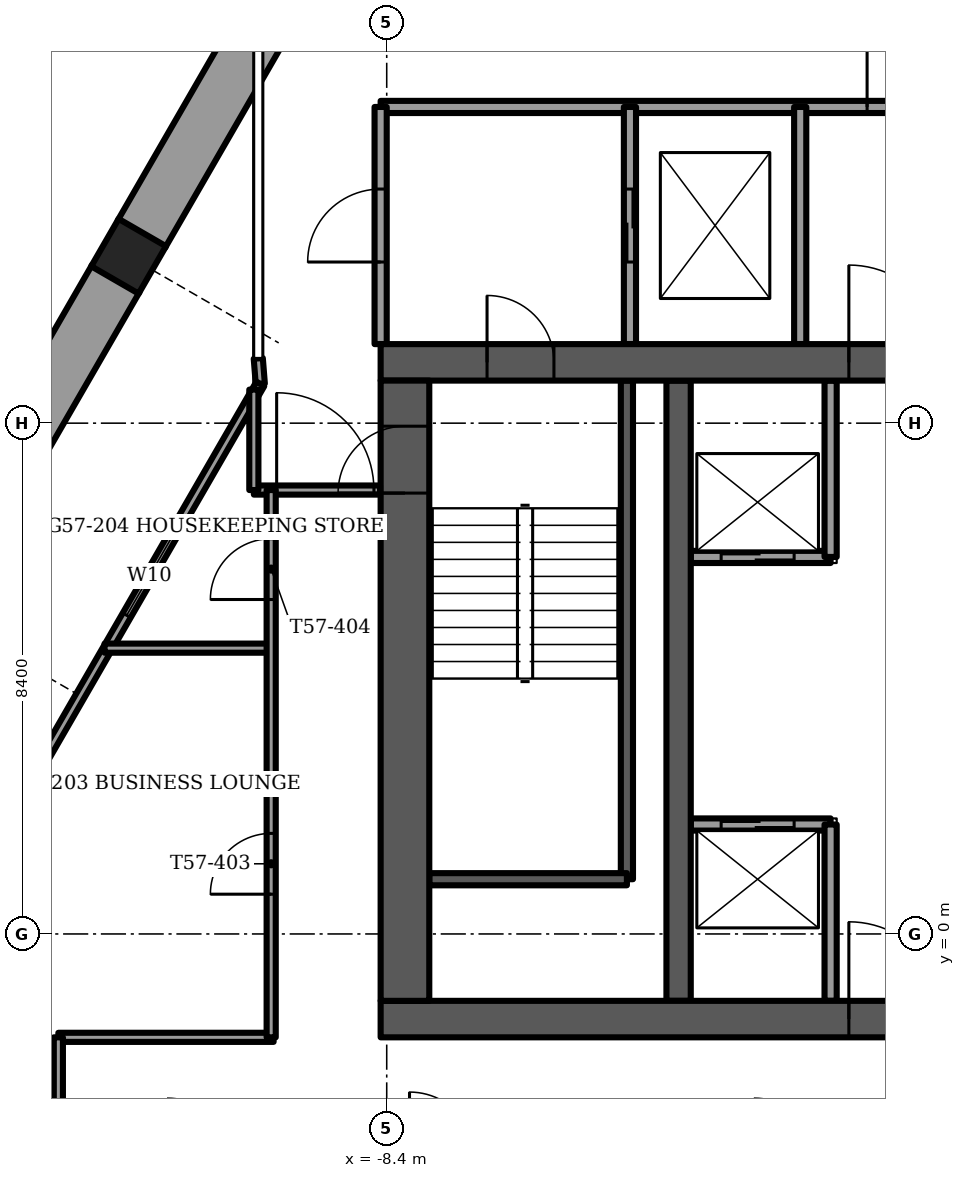
"""IFC4 building model, lengths in metres.
Left out: names, types, materials, properties, quantities, classifications, styles, units other than length and angle.
Written with IfcOpenShell. Run it as: python <this file> out.ifc"""

import sys

from ifc_helpers import new_model, si_unit, direction, frame, frame_2d, origin, origin_2d, place, context, subcontext, project, spatial, rectangle, extrude, element, fill, save


model = new_model("IFC4")
c1 = context("Model", 3, precision=1e-05, world=origin(), true_north=direction((0.0, 1.0)))
c2 = subcontext(c1, "Body", "Model", "MODEL_VIEW")
j1 = project(units=[si_unit("LENGTHUNIT", "METRE"), si_unit("PLANEANGLEUNIT", "RADIAN")], contexts=[c1])
p1 = place(None, origin())
s1 = spatial("IfcSite", under=j1, at=p1, CompositionType="ELEMENT")
p2 = place(p1, origin())
s2 = spatial("IfcBuilding", under=s1, at=p2, CompositionType="ELEMENT")
p3 = place(p2, frame((0.0, 0.0, 229.5)))
s3 = spatial("IfcBuildingStorey", under=s2, at=p3, CompositionType="ELEMENT", Elevation=229.5)
p4 = place(p3, frame((-12.644, 11.145, -1.2), z_axis=(0.0, 0.0, 1.0), x_axis=(0.5, 0.866025403784, 0.0)))
e1 = element("IfcColumn", 1, at=p4, inside=s3, PredefinedType="COLUMN", context=c2, shape_type="SweptSolid", body=[
    extrude(rectangle(XDim=0.9, YDim=0.9, at=origin_2d()), origin(), (0.0, 0.0, 1.0), 3.75),
])
p5 = place(p3, frame((-8.5, -1.4, -0.3), z_axis=(0.0, 0.0, 1.0), x_axis=(1.0, 0.0, 0.0)))
e2 = element("IfcWall", 2, at=p5, inside=s3, PredefinedType="SHEAR", context=c2, shape_type="SweptSolid", body=[
    extrude(rectangle(XDim=17.0, YDim=0.6, at=frame_2d((8.5, 0.0))), origin(), (0.0, 0.0, 1.0), 3.75),
])
p6 = place(p5, frame((7.7, 0.0, 0.0)))
e3 = element("IfcOpeningElement", 3, at=p6, cuts=e2, PredefinedType="OPENING", context=c2, shape_type="SweptSolid", body=[
    extrude(rectangle(XDim=1.6, YDim=2.1, at=frame_2d((0.8, 1.05))), frame((0.0, 0.3, 0.0), z_axis=(0.0, -1.0, 0.0), x_axis=(1.0, 0.0, 0.0)), (0.0, 0.0, 1.0), 0.6),
])
p7 = place(p3, frame((-8.5, 9.4, -0.3), z_axis=(0.0, 0.0, 1.0), x_axis=(1.0, 0.0, 0.0)))
e4 = element("IfcWall", 4, at=p7, inside=s3, PredefinedType="SHEAR", context=c2, shape_type="SweptSolid", body=[
    extrude(rectangle(XDim=17.0, YDim=0.6, at=frame_2d((8.5, 0.0))), origin(), (0.0, 0.0, 1.0), 3.75),
])
p8 = place(p7, frame((7.7, 0.0, 0.0)))
e5 = element("IfcOpeningElement", 5, at=p8, cuts=e4, PredefinedType="OPENING", context=c2, shape_type="SweptSolid", body=[
    extrude(rectangle(XDim=1.6, YDim=2.1, at=frame_2d((0.8, 1.05))), frame((0.0, 0.3, 0.0), z_axis=(0.0, -1.0, 0.0), x_axis=(1.0, 0.0, 0.0)), (0.0, 0.0, 1.0), 0.6),
])
p9 = place(p7, frame((1.75, 0.0, 0.0)))
e6 = element("IfcOpeningElement", 6, at=p9, cuts=e4, PredefinedType="OPENING", context=c2, shape_type="SweptSolid", body=[
    extrude(rectangle(XDim=1.1, YDim=2.1, at=frame_2d((0.55, 1.05))), frame((0.0, 0.3, 0.0), z_axis=(0.0, -1.0, 0.0), x_axis=(1.0, 0.0, 0.0)), (0.0, 0.0, 1.0), 0.6),
])
p10 = place(p7, frame((14.15, 0.0, 0.0)))
e7 = element("IfcOpeningElement", 7, at=p10, cuts=e4, PredefinedType="OPENING", context=c2, shape_type="SweptSolid", body=[
    extrude(rectangle(XDim=1.1, YDim=2.1, at=frame_2d((0.55, 1.05))), frame((0.0, 0.3, 0.0), z_axis=(0.0, -1.0, 0.0), x_axis=(1.0, 0.0, 0.0)), (0.0, 0.0, 1.0), 0.6),
])
p11 = place(p3, frame((-8.1, -1.1, -0.3), z_axis=(0.0, 0.0, 1.0), x_axis=(0.0, 1.0, 0.0)))
e8 = element("IfcWall", 8, at=p11, inside=s3, PredefinedType="SHEAR", context=c2, shape_type="SweptSolid", body=[
    extrude(rectangle(XDim=10.2, YDim=0.8, at=frame_2d((5.1, 0.0))), origin(), (0.0, 0.0, 1.0), 3.75),
])
p12 = place(p11, frame((8.35, 0.0, 0.0)))
e9 = element("IfcOpeningElement", 9, at=p12, cuts=e8, PredefinedType="OPENING", context=c2, shape_type="SweptSolid", body=[
    extrude(rectangle(XDim=1.1, YDim=2.1, at=frame_2d((0.55, 1.05))), frame((0.0, 0.4, 0.0), z_axis=(0.0, -1.0, 0.0), x_axis=(1.0, 0.0, 0.0)), (0.0, 0.0, 1.0), 0.8),
])
p13 = place(p3, frame((-3.6, -1.1, -0.3), z_axis=(0.0, 0.0, 1.0), x_axis=(0.0, 1.0, 0.0)))
e10 = element("IfcWall", 10, at=p13, inside=s3, PredefinedType="SHEAR", context=c2, shape_type="SweptSolid", body=[
    extrude(rectangle(XDim=10.2, YDim=0.4, at=frame_2d((5.1, 0.0))), origin(), (0.0, 0.0, 1.0), 3.75),
])
p14 = place(p3, frame((-9.594, 16.428, 0.0), z_axis=(0.0, 0.0, 1.0), x_axis=(-0.499994028088, -0.866028851642, 0.0)))
e11 = element("IfcWall", 11, at=p14, inside=s3, PredefinedType="PARAPET", context=c2, shape_type="SweptSolid", body=[
    extrude(rectangle(XDim=5.681, YDim=0.9, at=frame_2d((2.84, 0.0))), origin(), (0.0, 0.0, 1.0), 1.1),
])
p15 = place(p3, frame((-12.854, 10.781, 0.0), z_axis=(0.0, 0.0, 1.0), x_axis=(-0.499997265274, -0.866026982673, 0.0)))
e12 = element("IfcWall", 12, at=p15, inside=s3, PredefinedType="PARAPET", context=c2, shape_type="SweptSolid", body=[
    extrude(rectangle(XDim=5.819, YDim=0.9, at=frame_2d((2.909, 0.0))), origin(), (0.0, 0.0, 1.0), 1.1),
])
p16 = place(p3, frame((-10.479, 9.045, 0.0), z_axis=(0.0, 0.0, 1.0), x_axis=(-0.49998469459, -0.866034240187, 0.0)))
e13 = element("IfcWall", 13, at=p16, inside=s3, PredefinedType="SOLIDWALL", context=c2, shape_type="SweptSolid", body=[
    extrude(rectangle(XDim=10.208, YDim=0.15, at=frame_2d((5.104, 0.0))), origin(), (0.0, 0.0, 1.0), 3.45),
])
p17 = place(p16, frame((2.894, 0.0, 0.15)))
e14 = element("IfcOpeningElement", 14, at=p17, cuts=e13, PredefinedType="OPENING", context=c2, shape_type="SweptSolid", body=[
    extrude(rectangle(XDim=1.5, YDim=2.2, at=frame_2d((0.75, 1.1))), frame((0.0, 0.075, 0.0), z_axis=(0.0, -1.0, 0.0), x_axis=(1.0, 0.0, 0.0)), (0.0, 0.0, 1.0), 0.15),
])
p18 = place(p3, frame((-15.583, -0.86, 0.0), z_axis=(0.0, 0.0, 1.0), x_axis=(0.499995050918, -0.866028261119, 0.0)))
e15 = element("IfcWall", 15, at=p18, inside=s3, PredefinedType="SOLIDWALL", context=c2, shape_type="SweptSolid", body=[
    extrude(rectangle(XDim=10.208, YDim=0.15, at=frame_2d((5.104, 0.0))), origin(), (0.0, 0.0, 1.0), 3.45),
])
p19 = place(p18, frame((3.994, 0.0, 0.15)))
e16 = element("IfcOpeningElement", 16, at=p19, cuts=e15, PredefinedType="OPENING", context=c2, shape_type="SweptSolid", body=[
    extrude(rectangle(XDim=0.9, YDim=2.2, at=frame_2d((0.45, 1.1))), frame((0.0, 0.075, 0.0), z_axis=(0.0, -1.0, 0.0), x_axis=(1.0, 0.0, 0.0)), (0.0, 0.0, 1.0), 0.15),
])
p20 = place(p18, frame((5.347, 0.0, 0.15)))
e17 = element("IfcOpeningElement", 17, at=p20, cuts=e15, PredefinedType="OPENING", context=c2, shape_type="SweptSolid", body=[
    extrude(rectangle(XDim=1.4, YDim=2.2, at=frame_2d((0.7, 1.1))), frame((0.0, 0.075, 0.0), z_axis=(0.0, -1.0, 0.0), x_axis=(1.0, 0.0, 0.0)), (0.0, 0.0, 1.0), 0.15),
])
p21 = place(p3, frame((-10.479, 9.045, 0.0), z_axis=(0.0, 0.0, 1.0), x_axis=(-0.078869316502, 0.996884963732, 0.0)))
e18 = element("IfcWall", 18, at=p21, inside=s3, PredefinedType="SOLIDWALL", context=c2, shape_type="SweptSolid", body=[
    extrude(rectangle(XDim=0.421, YDim=0.15, at=frame_2d((0.21, 0.0))), origin(), (0.0, 0.0, 1.0), 3.45),
])
p22 = place(p3, frame((-3.4, 1.8, 0.0), z_axis=(0.0, 0.0, 1.0), x_axis=(1.0, 0.0, 0.0)))
e19 = element("IfcWall", 19, at=p22, inside=s3, PredefinedType="PARTITIONING", context=c2, shape_type="SweptSolid", body=[
    extrude(rectangle(XDim=2.3, YDim=0.2, at=frame_2d((1.15, 0.0))), origin(), (0.0, 0.0, 1.0), 3.45),
])
p23 = place(p22, frame((0.5, 0.0, 0.0)))
e20 = element("IfcOpeningElement", 20, at=p23, cuts=e19, PredefinedType="OPENING", context=c2, shape_type="SweptSolid", body=[
    extrude(rectangle(XDim=1.2, YDim=2.1, at=frame_2d((0.6, 1.05))), frame((0.0, 0.1, 0.0), z_axis=(0.0, -1.0, 0.0), x_axis=(1.0, 0.0, 0.0)), (0.0, 0.0, 1.0), 0.2),
])
p24 = place(p3, frame((-3.4, 6.2, 0.0), z_axis=(0.0, 0.0, 1.0), x_axis=(1.0, 0.0, 0.0)))
e21 = element("IfcWall", 21, at=p24, inside=s3, PredefinedType="PARTITIONING", context=c2, shape_type="SweptSolid", body=[
    extrude(rectangle(XDim=2.3, YDim=0.2, at=frame_2d((1.15, 0.0))), origin(), (0.0, 0.0, 1.0), 3.45),
])
p25 = place(p24, frame((0.5, 0.0, 0.0)))
e22 = element("IfcOpeningElement", 22, at=p25, cuts=e21, PredefinedType="OPENING", context=c2, shape_type="SweptSolid", body=[
    extrude(rectangle(XDim=1.2, YDim=2.1, at=frame_2d((0.6, 1.05))), frame((0.0, 0.1, 0.0), z_axis=(0.0, -1.0, 0.0), x_axis=(1.0, 0.0, 0.0)), (0.0, 0.0, 1.0), 0.2),
])
for number, where, z_axis, x_axis in (
    (23, (-1.1, -1.1, 0.0), (0.0, 0.0, 1.0), (0.0, 1.0, 0.0)),
    (24, (-1.1, 6.2, 0.0), (0.0, 0.0, 1.0), (0.0, 1.0, 0.0)),
):
    element("IfcWall", number, at=place(p3, frame(where, z_axis=z_axis, x_axis=x_axis)), inside=s3, PredefinedType="PARTITIONING", context=c2, shape_type="SweptSolid", body=[
        extrude(rectangle(XDim=2.9, YDim=0.2, at=frame_2d((1.45, 0.0))), origin(), (0.0, 0.0, 1.0), 3.45),
    ])
p26 = place(p3, frame((-4.45, 0.9, -0.3), z_axis=(0.0, 0.0, 1.0), x_axis=(0.0, 1.0, 0.0)))
e25 = element("IfcWall", 25, at=p26, inside=s3, PredefinedType="SOLIDWALL", context=c2, shape_type="SweptSolid", body=[
    extrude(rectangle(XDim=8.2, YDim=0.2, at=frame_2d((4.1, 0.0))), origin(), (0.0, 0.0, 1.0), 3.75),
])
p27 = place(p3, frame((-7.7, 0.9, -0.3), z_axis=(0.0, 0.0, 1.0), x_axis=(1.0, 0.0, 0.0)))
e26 = element("IfcWall", 26, at=p27, inside=s3, PredefinedType="SOLIDWALL", context=c2, shape_type="SweptSolid", body=[
    extrude(rectangle(XDim=3.25, YDim=0.2, at=frame_2d((1.625, 0.0))), origin(), (0.0, 0.0, 1.0), 3.75),
])
p28 = place(p3, frame((-8.5, 13.6, 0.0), z_axis=(0.0, 0.0, 1.0), x_axis=(1.0, 0.0, 0.0)))
e27 = element("IfcWall", 27, at=p28, inside=s3, PredefinedType="PARTITIONING", context=c2, shape_type="SweptSolid", body=[
    extrude(rectangle(XDim=17.0, YDim=0.2, at=frame_2d((8.5, 0.0))), origin(), (0.0, 0.0, 1.0), 3.45),
])
p29 = place(p28, frame((8.0, 0.0, 0.0)))
e28 = element("IfcOpeningElement", 28, at=p29, cuts=e27, PredefinedType="OPENING", context=c2, shape_type="SweptSolid", body=[
    extrude(rectangle(XDim=1.0, YDim=2.1, at=frame_2d((0.5, 1.05))), frame((0.0, 0.1, 0.0), z_axis=(0.0, -1.0, 0.0), x_axis=(1.0, 0.0, 0.0)), (0.0, 0.0, 1.0), 0.2),
])
p30 = place(p3, frame((-8.5, 9.7, 0.0), z_axis=(0.0, 0.0, 1.0), x_axis=(0.0, 1.0, 0.0)))
e29 = element("IfcWall", 29, at=p30, inside=s3, PredefinedType="PARTITIONING", context=c2, shape_type="SweptSolid", body=[
    extrude(rectangle(XDim=3.9, YDim=0.2, at=frame_2d((1.95, 0.0))), origin(), (0.0, 0.0, 1.0), 3.45),
])
p31 = place(p30, frame((1.35, 0.0, 0.0)))
e30 = element("IfcOpeningElement", 30, at=p31, cuts=e29, PredefinedType="OPENING", context=c2, shape_type="SweptSolid", body=[
    extrude(rectangle(XDim=1.2, YDim=2.1, at=frame_2d((0.6, 1.05))), frame((0.0, 0.1, 0.0), z_axis=(0.0, -1.0, 0.0), x_axis=(1.0, 0.0, 0.0)), (0.0, 0.0, 1.0), 0.2),
])
p32 = place(p3, frame((-4.4, 9.7, 0.0), z_axis=(0.0, 0.0, 1.0), x_axis=(0.0, 1.0, 0.0)))
e31 = element("IfcWall", 31, at=p32, inside=s3, PredefinedType="PARTITIONING", context=c2, shape_type="SweptSolid", body=[
    extrude(rectangle(XDim=3.9, YDim=0.2, at=frame_2d((1.95, 0.0))), origin(), (0.0, 0.0, 1.0), 3.45),
])
p33 = place(p32, frame((1.35, 0.0, 0.0)))
e32 = element("IfcOpeningElement", 32, at=p33, cuts=e31, PredefinedType="OPENING", context=c2, shape_type="SweptSolid", body=[
    extrude(rectangle(XDim=1.2, YDim=2.1, at=frame_2d((0.6, 1.05))), frame((0.0, 0.1, 0.0), z_axis=(0.0, -1.0, 0.0), x_axis=(1.0, 0.0, 0.0)), (0.0, 0.0, 1.0), 0.2),
])
p34 = place(p3, frame((-1.6, 9.7, 0.0), z_axis=(0.0, 0.0, 1.0), x_axis=(0.0, 1.0, 0.0)))
e33 = element("IfcWall", 33, at=p34, inside=s3, PredefinedType="PARTITIONING", context=c2, shape_type="SweptSolid", body=[
    extrude(rectangle(XDim=3.9, YDim=0.2, at=frame_2d((1.95, 0.0))), origin(), (0.0, 0.0, 1.0), 3.45),
])
p35 = place(p3, frame((-13.8, -1.7, 0.0), z_axis=(0.0, 0.0, 1.0), x_axis=(1.0, 0.0, 0.0)))
e34 = element("IfcWall", 34, at=p35, inside=s3, PredefinedType="PARTITIONING", context=c2, shape_type="SweptSolid", body=[
    extrude(rectangle(XDim=3.54, YDim=0.15, at=frame_2d((1.77, 0.0))), origin(), (0.0, 0.0, 1.0), 3.45),
])
p36 = place(p3, frame((-13.04, 4.7, 0.0), z_axis=(0.0, 0.0, 1.0), x_axis=(1.0, 0.0, 0.0)))
e35 = element("IfcWall", 35, at=p36, inside=s3, PredefinedType="PARTITIONING", context=c2, shape_type="SweptSolid", body=[
    extrude(rectangle(XDim=2.74, YDim=0.15, at=frame_2d((1.37, 0.0))), origin(), (0.0, 0.0, 1.0), 3.45),
])
p37 = place(p3, frame((-10.585, 7.3, 0.0), z_axis=(0.0, 0.0, 1.0), x_axis=(1.0, 0.0, 0.0)))
e36 = element("IfcWall", 36, at=p37, inside=s3, PredefinedType="PARTITIONING", context=c2, shape_type="SweptSolid", body=[
    extrude(rectangle(XDim=2.075, YDim=0.15, at=frame_2d((1.038, 0.0))), origin(), (0.0, 0.0, 1.0), 3.45),
])
p38 = place(p37, frame((0.375, 0.0, 0.0)))
e37 = element("IfcOpeningElement", 37, at=p38, cuts=e36, PredefinedType="OPENING", context=c2, shape_type="SweptSolid", body=[
    extrude(rectangle(XDim=1.6, YDim=2.1, at=frame_2d((0.8, 1.05))), frame((0.0, 0.075, 0.0), z_axis=(0.0, -1.0, 0.0), x_axis=(1.0, 0.0, 0.0)), (0.0, 0.0, 1.0), 0.15),
])
p39 = place(p3, frame((-10.3, -1.7, 0.0), z_axis=(0.0, 0.0, 1.0), x_axis=(0.0, 1.0, 0.0)))
e38 = element("IfcWall", 38, at=p39, inside=s3, PredefinedType="PARTITIONING", context=c2, shape_type="SweptSolid", body=[
    extrude(rectangle(XDim=9.0, YDim=0.15, at=frame_2d((4.5, 0.0))), origin(), (0.0, 0.0, 1.0), 3.45),
])
p40 = place(p39, frame((2.354, 0.0, 0.0)))
e39 = element("IfcOpeningElement", 39, at=p40, cuts=e38, PredefinedType="OPENING", context=c2, shape_type="SweptSolid", body=[
    extrude(rectangle(XDim=1.0, YDim=2.1, at=frame_2d((0.5, 1.05))), frame((0.0, 0.075, 0.0), z_axis=(0.0, -1.0, 0.0), x_axis=(1.0, 0.0, 0.0)), (0.0, 0.0, 1.0), 0.15),
])
p41 = place(p39, frame((7.2, 0.0, 0.0)))
e40 = element("IfcOpeningElement", 40, at=p41, cuts=e38, PredefinedType="OPENING", context=c2, shape_type="SweptSolid", body=[
    extrude(rectangle(XDim=1.0, YDim=2.1, at=frame_2d((0.5, 1.05))), frame((0.0, 0.075, 0.0), z_axis=(0.0, -1.0, 0.0), x_axis=(1.0, 0.0, 0.0)), (0.0, 0.0, 1.0), 0.15),
])
p42 = place(p3, frame((-10.585, 7.3, 0.0), z_axis=(0.0, 0.0, 1.0), x_axis=(0.0, 1.0, 0.0)))
e41 = element("IfcWall", 41, at=p42, inside=s3, PredefinedType="PARTITIONING", context=c2, shape_type="SweptSolid", body=[
    extrude(rectangle(XDim=1.652, YDim=0.15, at=frame_2d((0.826, 0.0))), origin(), (0.0, 0.0, 1.0), 3.45),
])
p43 = place(p3, frame((-13.8, -4.038, 0.0), z_axis=(0.0, 0.0, 1.0), x_axis=(0.0, 1.0, 0.0)))
e42 = element("IfcWall", 42, at=p43, inside=s3, PredefinedType="PARTITIONING", context=c2, shape_type="SweptSolid", body=[
    extrude(rectangle(XDim=2.338, YDim=0.15, at=frame_2d((1.169, 0.0))), origin(), (0.0, 0.0, 1.0), 3.45),
])
p44 = place(p17, origin())
e43 = element("IfcWindow", 43, at=p44, inside=s3, PartitioningType="SINGLE_PANEL", PredefinedType="WINDOW", context=c2, shape_type="SweptSolid", body=[
    extrude(rectangle(XDim=1.5, YDim=2.2, at=frame_2d((0.75, 1.1))), frame((0.0, 0.03, 0.0), z_axis=(0.0, -1.0, 0.0), x_axis=(1.0, 0.0, 0.0)), (0.0, 0.0, 1.0), 0.06),
])
fill(e14, e43)
p45 = place(p23, origin())
e44 = element("IfcDoor", 44, at=p45, inside=s3, OperationType="SLIDING_TO_LEFT", PredefinedType="DOOR", context=c2, shape_type="SweptSolid", body=[
    extrude(rectangle(XDim=1.2, YDim=2.1, at=frame_2d((0.6, 1.05))), frame((0.0, 0.025, 0.0), z_axis=(0.0, -1.0, 0.0), x_axis=(1.0, 0.0, 0.0)), (0.0, 0.0, 1.0), 0.05),
])
fill(e20, e44)
p46 = place(p25, origin())
e45 = element("IfcDoor", 45, at=p46, inside=s3, OperationType="SLIDING_TO_LEFT", PredefinedType="DOOR", context=c2, shape_type="SweptSolid", body=[
    extrude(rectangle(XDim=1.2, YDim=2.1, at=frame_2d((0.6, 1.05))), frame((0.0, 0.025, 0.0), z_axis=(0.0, -1.0, 0.0), x_axis=(1.0, 0.0, 0.0)), (0.0, 0.0, 1.0), 0.05),
])
fill(e22, e45)
p47 = place(p6, origin())
e46 = element("IfcDoor", 46, at=p47, inside=s3, OperationType="DOUBLE_DOOR_SINGLE_SWING", PredefinedType="DOOR", context=c2, shape_type="SweptSolid", body=[
    extrude(rectangle(XDim=1.6, YDim=2.1, at=frame_2d((0.8, 1.05))), frame((0.0, 0.025, 0.0), z_axis=(0.0, -1.0, 0.0), x_axis=(1.0, 0.0, 0.0)), (0.0, 0.0, 1.0), 0.05),
])
fill(e3, e46)
p48 = place(p8, origin())
e47 = element("IfcDoor", 47, at=p48, inside=s3, OperationType="DOUBLE_DOOR_SINGLE_SWING", PredefinedType="DOOR", context=c2, shape_type="SweptSolid", body=[
    extrude(rectangle(XDim=1.6, YDim=2.1, at=frame_2d((0.8, 1.05))), frame((0.0, 0.025, 0.0), z_axis=(0.0, -1.0, 0.0), x_axis=(1.0, 0.0, 0.0)), (0.0, 0.0, 1.0), 0.05),
])
fill(e5, e47)
p49 = place(p9, origin())
e48 = element("IfcDoor", 48, at=p49, inside=s3, OperationType="SINGLE_SWING_LEFT", PredefinedType="DOOR", context=c2, shape_type="SweptSolid", body=[
    extrude(rectangle(XDim=1.1, YDim=2.1, at=frame_2d((0.55, 1.05))), frame((0.0, 0.025, 0.0), z_axis=(0.0, -1.0, 0.0), x_axis=(1.0, 0.0, 0.0)), (0.0, 0.0, 1.0), 0.05),
])
fill(e6, e48)
p50 = place(p12, origin())
e49 = element("IfcDoor", 49, at=p50, inside=s3, OperationType="SINGLE_SWING_RIGHT", PredefinedType="DOOR", context=c2, shape_type="SweptSolid", body=[
    extrude(rectangle(XDim=1.1, YDim=2.1, at=frame_2d((0.55, 1.05))), frame((0.0, 0.025, 0.0), z_axis=(0.0, -1.0, 0.0), x_axis=(1.0, 0.0, 0.0)), (0.0, 0.0, 1.0), 0.05),
])
fill(e9, e49)
p51 = place(p33, origin())
e50 = element("IfcDoor", 50, at=p51, inside=s3, OperationType="SLIDING_TO_LEFT", PredefinedType="DOOR", context=c2, shape_type="SweptSolid", body=[
    extrude(rectangle(XDim=1.2, YDim=2.1, at=frame_2d((0.6, 1.05))), frame((0.0, 0.025, 0.0), z_axis=(0.0, -1.0, 0.0), x_axis=(1.0, 0.0, 0.0)), (0.0, 0.0, 1.0), 0.05),
])
fill(e32, e50)
p52 = place(p31, origin())
e51 = element("IfcDoor", 51, at=p52, inside=s3, OperationType="SINGLE_SWING_LEFT", PredefinedType="DOOR", context=c2, shape_type="SweptSolid", body=[
    extrude(rectangle(XDim=1.2, YDim=2.1, at=frame_2d((0.6, 1.05))), frame((0.0, 0.025, 0.0), z_axis=(0.0, -1.0, 0.0), x_axis=(1.0, 0.0, 0.0)), (0.0, 0.0, 1.0), 0.05),
])
fill(e30, e51)
p53 = place(p29, origin())
e52 = element("IfcDoor", 52, at=p53, inside=s3, OperationType="SINGLE_SWING_LEFT", PredefinedType="DOOR", context=c2, shape_type="SweptSolid", body=[
    extrude(rectangle(XDim=1.0, YDim=2.1, at=frame_2d((0.5, 1.05))), frame((0.0, 0.025, 0.0), z_axis=(0.0, -1.0, 0.0), x_axis=(1.0, 0.0, 0.0)), (0.0, 0.0, 1.0), 0.05),
])
fill(e28, e52)
p54 = place(p40, origin())
e53 = element("IfcDoor", 53, at=p54, inside=s3, OperationType="SINGLE_SWING_LEFT", PredefinedType="DOOR", context=c2, shape_type="SweptSolid", body=[
    extrude(rectangle(XDim=1.0, YDim=2.1, at=frame_2d((0.5, 1.05))), frame((0.0, 0.025, 0.0), z_axis=(0.0, -1.0, 0.0), x_axis=(1.0, 0.0, 0.0)), (0.0, 0.0, 1.0), 0.05),
])
fill(e39, e53)
p55 = place(p41, origin())
e54 = element("IfcDoor", 54, at=p55, inside=s3, OperationType="SINGLE_SWING_LEFT", PredefinedType="DOOR", context=c2, shape_type="SweptSolid", body=[
    extrude(rectangle(XDim=1.0, YDim=2.1, at=frame_2d((0.5, 1.05))), frame((0.0, 0.025, 0.0), z_axis=(0.0, -1.0, 0.0), x_axis=(1.0, 0.0, 0.0)), (0.0, 0.0, 1.0), 0.05),
])
fill(e40, e54)
p56 = place(p38, origin())
e55 = element("IfcDoor", 55, at=p56, inside=s3, OperationType="DOUBLE_DOOR_SINGLE_SWING", PredefinedType="DOOR", context=c2, shape_type="SweptSolid", body=[
    extrude(rectangle(XDim=1.6, YDim=2.1, at=frame_2d((0.8, 1.05))), frame((0.0, 0.025, 0.0), z_axis=(0.0, -1.0, 0.0), x_axis=(1.0, 0.0, 0.0)), (0.0, 0.0, 1.0), 0.05),
])
fill(e37, e55)
save(model, sys.argv[1])
